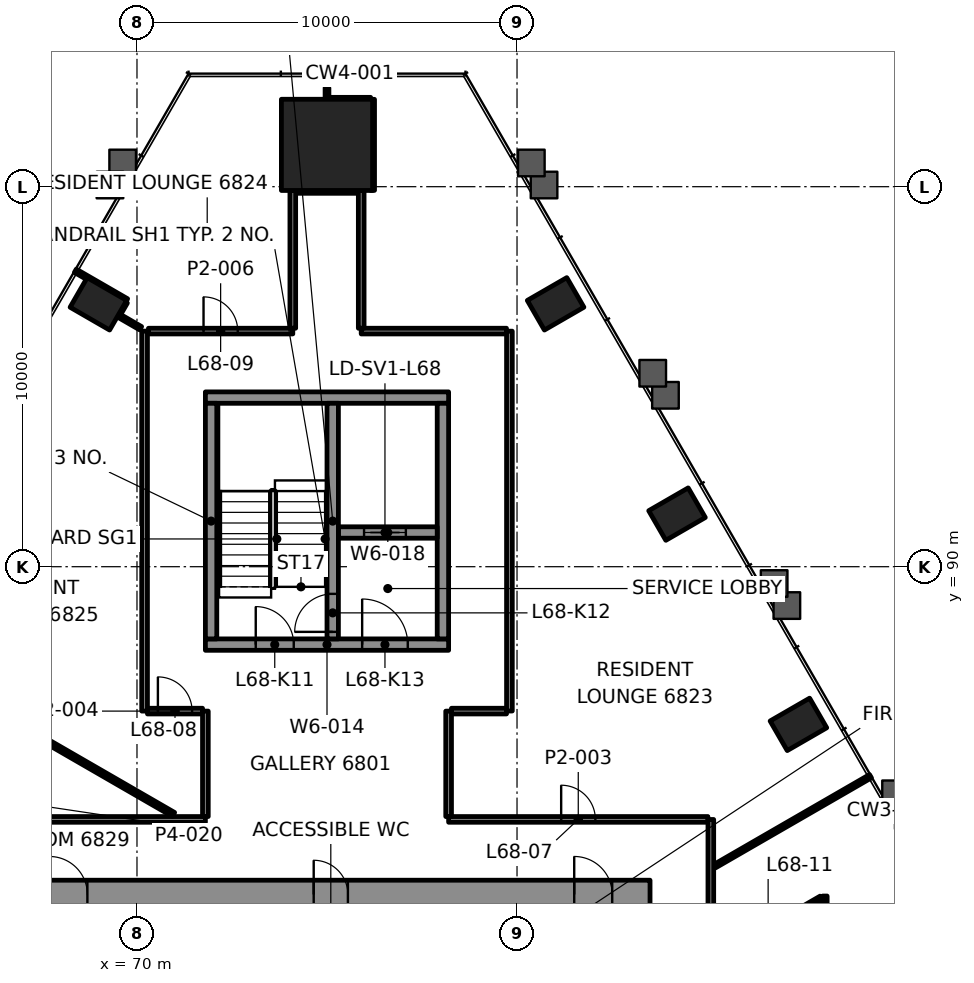
"""IFC4 building model, lengths in metres.
Left out: names, types, materials, properties, quantities, classifications, styles, units other than length and angle.
Written with IfcOpenShell. Run it as: python <this file> out.ifc"""

import sys

from ifc_helpers import new_model, si_unit, direction, frame, frame_2d, origin, origin_2d, place, context, subcontext, project, spatial, rectangle, hollow_rectangle, extrude, element, fill, save


model = new_model("IFC4")
c1 = context("Model", 3, precision=1e-05, world=origin(), true_north=direction((0.0, 1.0)))
c2 = subcontext(c1, "Body", "Model", "MODEL_VIEW")
j1 = project(units=[si_unit("LENGTHUNIT", "METRE"), si_unit("PLANEANGLEUNIT", "RADIAN")], contexts=[c1])
p1 = place(None, origin())
s1 = spatial("IfcSite", under=j1, at=p1, CompositionType="ELEMENT")
p2 = place(p1, origin())
s2 = spatial("IfcBuilding", under=s1, at=p2, CompositionType="ELEMENT")
p3 = place(p2, frame((0.0, 0.0, 284.6)))
s3 = spatial("IfcBuildingStorey", under=s2, at=p3, CompositionType="ELEMENT", Elevation=284.6)
p4 = place(p3, frame((75.0, 101.101, 0.0), z_axis=(0.0, 0.0, 1.0), x_axis=(-1.0, 0.0, 0.0)))
e1 = element("IfcColumn", 1, at=p4, inside=s3, PredefinedType="COLUMN", context=c2, shape_type="SweptSolid", body=[
    extrude(rectangle(XDim=2.4, YDim=2.4, at=origin_2d()), origin(), (0.0, 0.0, 1.0), 3.5),
])
for number, where, z_axis, x_axis in (
    (2, (87.405, 85.851, -0.0), (0.0, 0.0, 1.0), (-0.5, 0.866, 0.0)),
    (3, (84.21, 91.384, -0.0), (0.0, 0.0, 1.0), (-0.5, 0.866, 0.0)),
    (4, (81.015, 96.917, -0.0), (0.0, 0.0, 1.0), (-0.5, 0.866, 0.0)),
    (5, (68.985, 96.917, -0.0), (0.0, 0.0, 1.0), (-0.5, -0.866, 0.0)),
):
    element("IfcColumn", number, at=place(p3, frame(where, z_axis=z_axis, x_axis=x_axis)), inside=s3, PredefinedType="COLUMN", context=c2, shape_type="SweptSolid", body=[
        extrude(hollow_rectangle(XDim=0.9, YDim=1.2, WallThickness=0.06, at=origin_2d()), origin(), (0.0, 0.0, 1.0), 3.5),
    ])
p5 = place(p3, frame((66.5, 81.375, 0.0), z_axis=(0.0, 0.0, 1.0), x_axis=(1.0, 0.0, 0.0)))
e6 = element("IfcWall", 6, at=p5, inside=s3, PredefinedType="SHEAR", context=c2, shape_type="SweptSolid", body=[
    extrude(rectangle(XDim=17.0, YDim=0.75, at=frame_2d((8.5, 0.0))), origin(), (0.0, 0.0, 1.0), 3.3),
])
p6 = place(p5, frame((1.195, 0.0, 0.0)))
e7 = element("IfcOpeningElement", 7, at=p6, cuts=e6, PredefinedType="OPENING", context=c2, shape_type="SweptSolid", body=[
    extrude(rectangle(XDim=1.0, YDim=2.1, at=frame_2d((0.5, 1.05))), frame((0.0, 0.385, 0.0), z_axis=(0.0, -1.0, 0.0), x_axis=(1.0, 0.0, 0.0)), (0.0, 0.0, 1.0), 0.77),
])
p7 = place(p5, frame((15.005, 0.0, 0.0)))
e8 = element("IfcOpeningElement", 8, at=p7, cuts=e6, PredefinedType="OPENING", context=c2, shape_type="SweptSolid", body=[
    extrude(rectangle(XDim=1.0, YDim=2.1, at=frame_2d((0.5, 1.05))), frame((0.0, 0.385, 0.0), z_axis=(0.0, -1.0, 0.0), x_axis=(1.0, 0.0, 0.0)), (0.0, 0.0, 1.0), 0.77),
])
p8 = place(p5, frame((8.15, 0.0, 0.0)))
e9 = element("IfcOpeningElement", 9, at=p8, cuts=e6, PredefinedType="OPENING", context=c2, shape_type="SweptSolid", body=[
    extrude(rectangle(XDim=0.9, YDim=2.1, at=frame_2d((0.45, 1.05))), frame((0.0, 0.385, 0.0), z_axis=(0.0, -1.0, 0.0), x_axis=(1.0, 0.0, 0.0)), (0.0, 0.0, 1.0), 0.77),
])
p9 = place(p3, frame((71.8, 87.95, 0.0), z_axis=(0.0, 0.0, 1.0), x_axis=(1.0, 0.0, 0.0)))
e10 = element("IfcWall", 10, at=p9, inside=s3, PredefinedType="SHEAR", context=c2, shape_type="SweptSolid", body=[
    extrude(rectangle(XDim=6.4, YDim=0.3, at=frame_2d((3.2, 0.0))), origin(), (0.0, 0.0, 1.0), 3.3),
])
p10 = place(p9, frame((1.325, 0.0, 0.0)))
e11 = element("IfcOpeningElement", 11, at=p10, cuts=e10, PredefinedType="OPENING", context=c2, shape_type="SweptSolid", body=[
    extrude(rectangle(XDim=1.0, YDim=2.1, at=frame_2d((0.5, 1.05))), frame((0.0, 0.16, 0.0), z_axis=(0.0, -1.0, 0.0), x_axis=(1.0, 0.0, 0.0)), (0.0, 0.0, 1.0), 0.32),
])
p11 = place(p9, frame((4.125, 0.0, 0.0)))
e12 = element("IfcOpeningElement", 12, at=p11, cuts=e10, PredefinedType="OPENING", context=c2, shape_type="SweptSolid", body=[
    extrude(rectangle(XDim=1.2, YDim=2.1, at=frame_2d((0.6, 1.05))), frame((0.0, 0.16, 0.0), z_axis=(0.0, -1.0, 0.0), x_axis=(1.0, 0.0, 0.0)), (0.0, 0.0, 1.0), 0.32),
])
p12 = place(p3, frame((71.8, 94.45, 0.0), z_axis=(0.0, 0.0, 1.0), x_axis=(1.0, 0.0, 0.0)))
e13 = element("IfcWall", 13, at=p12, inside=s3, PredefinedType="SHEAR", context=c2, shape_type="SweptSolid", body=[
    extrude(rectangle(XDim=6.4, YDim=0.3, at=frame_2d((3.2, 0.0))), origin(), (0.0, 0.0, 1.0), 3.3),
])
for number, where, z_axis, x_axis in (
    (14, (71.95, 88.1, 0.0), (0.0, 0.0, 1.0), (0.0, 1.0, 0.0)),
    (15, (78.05, 88.1, 0.0), (0.0, 0.0, 1.0), (0.0, 1.0, 0.0)),
):
    element("IfcWall", number, at=place(p3, frame(where, z_axis=z_axis, x_axis=x_axis)), inside=s3, PredefinedType="SHEAR", context=c2, shape_type="SweptSolid", body=[
        extrude(rectangle(XDim=6.2, YDim=0.3, at=frame_2d((3.1, 0.0))), origin(), (0.0, 0.0, 1.0), 3.3),
    ])
p13 = place(p3, frame((75.3, 90.9, 0.0), z_axis=(0.0, 0.0, 1.0), x_axis=(1.0, 0.0, 0.0)))
e16 = element("IfcWall", 16, at=p13, inside=s3, PredefinedType="SHEAR", context=c2, shape_type="SweptSolid", body=[
    extrude(rectangle(XDim=2.6, YDim=0.3, at=frame_2d((1.3, 0.0))), origin(), (0.0, 0.0, 1.0), 3.3),
])
p14 = place(p13, frame((0.675, 0.0, 0.0)))
e17 = element("IfcOpeningElement", 17, at=p14, cuts=e16, PredefinedType="OPENING", context=c2, shape_type="SweptSolid", body=[
    extrude(rectangle(XDim=1.1, YDim=2.1, at=frame_2d((0.55, 1.05))), frame((0.0, 0.16, 0.0), z_axis=(0.0, -1.0, 0.0), x_axis=(1.0, 0.0, 0.0)), (0.0, 0.0, 1.0), 0.32),
])
p15 = place(p3, frame((75.15, 88.1, 0.0), z_axis=(0.0, 0.0, 1.0), x_axis=(0.0, 1.0, 0.0)))
e18 = element("IfcWall", 18, at=p15, inside=s3, PredefinedType="SHEAR", context=c2, shape_type="SweptSolid", body=[
    extrude(rectangle(XDim=6.2, YDim=0.3, at=frame_2d((3.1, 0.0))), origin(), (0.0, 0.0, 1.0), 3.3),
])
p16 = place(p15, frame((0.185, 0.0, 0.0)))
e19 = element("IfcOpeningElement", 19, at=p16, cuts=e18, PredefinedType="OPENING", context=c2, shape_type="SweptSolid", body=[
    extrude(rectangle(XDim=1.0, YDim=2.1, at=frame_2d((0.5, 1.05))), frame((0.0, 0.16, 0.0), z_axis=(0.0, -1.0, 0.0), x_axis=(1.0, 0.0, 0.0)), (0.0, 0.0, 1.0), 0.32),
])
p17 = place(p3, frame((64.975, 83.35, 0.0), z_axis=(0.0, 0.0, 1.0), x_axis=(1.0, 0.0, 0.0)))
e20 = element("IfcWall", 20, at=p17, inside=s3, PredefinedType="PARTITIONING", context=c2, shape_type="SweptSolid", body=[
    extrude(rectangle(XDim=6.825, YDim=0.15, at=frame_2d((3.413, 0.0))), origin(), (0.0, 0.0, 1.0), 2.7),
])
p18 = place(p3, frame((78.2, 83.35, 0.0), z_axis=(0.0, 0.0, 1.0), x_axis=(1.0, 0.0, 0.0)))
e21 = element("IfcWall", 21, at=p18, inside=s3, PredefinedType="PARTITIONING", context=c2, shape_type="SweptSolid", body=[
    extrude(rectangle(XDim=6.823, YDim=0.15, at=frame_2d((3.412, 0.0))), origin(), (0.0, 0.0, 1.0), 2.7),
])
p19 = place(p18, frame((2.961, 0.0, 0.0)))
e22 = element("IfcOpeningElement", 22, at=p19, cuts=e21, PredefinedType="OPENING", context=c2, shape_type="SweptSolid", body=[
    extrude(rectangle(XDim=0.9, YDim=2.1, at=frame_2d((0.45, 1.05))), frame((0.0, 0.085, 0.0), z_axis=(0.0, -1.0, 0.0), x_axis=(1.0, 0.0, 0.0)), (0.0, 0.0, 1.0), 0.17),
])
p20 = place(p3, frame((70.276, 86.2, 0.0), z_axis=(0.0, 0.0, 1.0), x_axis=(1.0, 0.0, 0.0)))
e23 = element("IfcWall", 23, at=p20, inside=s3, PredefinedType="PARTITIONING", context=c2, shape_type="SweptSolid", body=[
    extrude(rectangle(XDim=1.449, YDim=0.15, at=frame_2d((0.725, 0.0))), origin(), (0.0, 0.0, 1.0), 2.7),
])
p21 = place(p20, frame((0.275, 0.0, 0.0)))
e24 = element("IfcOpeningElement", 24, at=p21, cuts=e23, PredefinedType="OPENING", context=c2, shape_type="SweptSolid", body=[
    extrude(rectangle(XDim=0.9, YDim=2.1, at=frame_2d((0.45, 1.05))), frame((0.0, 0.085, 0.0), z_axis=(0.0, -1.0, 0.0), x_axis=(1.0, 0.0, 0.0)), (0.0, 0.0, 1.0), 0.17),
])
p22 = place(p3, frame((78.275, 86.2, 0.0), z_axis=(0.0, 0.0, 1.0), x_axis=(1.0, 0.0, 0.0)))
e25 = element("IfcWall", 25, at=p22, inside=s3, PredefinedType="PARTITIONING", context=c2, shape_type="SweptSolid", body=[
    extrude(rectangle(XDim=1.448, YDim=0.15, at=frame_2d((0.724, 0.0))), origin(), (0.0, 0.0, 1.0), 2.7),
])
p23 = place(p3, frame((70.302, 96.2, 0.0), z_axis=(0.0, 0.0, 1.0), x_axis=(1.0, 0.0, 0.0)))
e26 = element("IfcWall", 26, at=p23, inside=s3, PredefinedType="PARTITIONING", context=c2, shape_type="SweptSolid", body=[
    extrude(rectangle(XDim=3.798, YDim=0.15, at=frame_2d((1.899, 0.0))), origin(), (0.0, 0.0, 1.0), 2.7),
])
p24 = place(p23, frame((1.449, 0.0, 0.0)))
e27 = element("IfcOpeningElement", 27, at=p24, cuts=e26, PredefinedType="OPENING", context=c2, shape_type="SweptSolid", body=[
    extrude(rectangle(XDim=0.9, YDim=2.1, at=frame_2d((0.45, 1.05))), frame((0.0, 0.085, 0.0), z_axis=(0.0, -1.0, 0.0), x_axis=(1.0, 0.0, 0.0)), (0.0, 0.0, 1.0), 0.17),
])
p25 = place(p3, frame((75.9, 96.2, 0.0), z_axis=(0.0, 0.0, 1.0), x_axis=(1.0, 0.0, 0.0)))
e28 = element("IfcWall", 28, at=p25, inside=s3, PredefinedType="PARTITIONING", context=c2, shape_type="SweptSolid", body=[
    extrude(rectangle(XDim=3.823, YDim=0.15, at=frame_2d((1.911, 0.0))), origin(), (0.0, 0.0, 1.0), 2.7),
])
p26 = place(p3, frame((74.176, 99.901, 0.0), z_axis=(0.0, 0.0, 1.0), x_axis=(1.0, 0.0, 0.0)))
e29 = element("IfcWall", 29, at=p26, inside=s3, PredefinedType="PARTITIONING", context=c2, shape_type="SweptSolid", body=[
    extrude(rectangle(XDim=1.642, YDim=0.15, at=frame_2d((0.821, 0.0))), origin(), (0.0, 0.0, 1.0), 2.697),
])
p27 = place(p3, frame((75.0, 102.301, 0.0), z_axis=(0.0, 0.0, 1.0), x_axis=(1.0, 0.0, 0.0)))
e30 = element("IfcWall", 30, at=p27, inside=s3, PredefinedType="PARTITIONING", context=c2, shape_type="SweptSolid", body=[
    extrude(rectangle(XDim=1.147, YDim=0.1, at=frame_2d((0.574, 0.0))), origin(), (0.0, 0.0, 1.0), 2.7),
])
p28 = place(p3, frame((88.005, 81.279, 0.0), z_axis=(0.0, 0.0, 1.0), x_axis=(-0.866000447062, -0.500043223821, 0.0)))
e31 = element("IfcWall", 31, at=p28, inside=s3, PredefinedType="PARTITIONING", context=c2, shape_type="SweptSolid", body=[
    extrude(rectangle(XDim=3.228, YDim=0.12, at=frame_2d((1.614, 0.0))), origin(), (0.0, 0.0, 1.0), 2.7),
])
p29 = place(p28, frame((1.214, 0.0, 0.0)))
e32 = element("IfcOpeningElement", 32, at=p29, cuts=e31, PredefinedType="OPENING", context=c2, shape_type="SweptSolid", body=[
    extrude(rectangle(XDim=0.8, YDim=2.1, at=frame_2d((0.4, 1.05))), frame((0.0, 0.07, 0.0), z_axis=(0.0, -1.0, 0.0), x_axis=(1.0, 0.0, 0.0)), (0.0, 0.0, 1.0), 0.14),
])
p30 = place(p3, frame((85.201, 82.119, 0.0), z_axis=(0.0, 0.0, 1.0), x_axis=(0.866035297817, 0.499982862641, 0.0)))
e33 = element("IfcWall", 33, at=p30, inside=s3, PredefinedType="PARTITIONING", context=c2, shape_type="SweptSolid", body=[
    extrude(rectangle(XDim=4.734, YDim=0.1, at=frame_2d((2.367, 0.0))), origin(), (0.0, 0.0, 1.0), 2.688),
])
p31 = place(p3, frame((69.53, 96.661, 0.0), z_axis=(0.0, 0.0, 1.0), x_axis=(0.499904278411, 0.866080661617, 0.0)))
e34 = element("IfcWall", 34, at=p31, inside=s3, PredefinedType="PARTITIONING", context=c2, shape_type="SweptSolid", body=[
    extrude(rectangle(XDim=0.349, YDim=0.1, at=frame_2d((0.174, 0.0))), origin(), (0.0, 0.0, 1.0), 2.7),
])
p32 = place(p3, frame((88.1, 81.334, 0.0), z_axis=(0.0, 0.0, 1.0), x_axis=(0.0, -1.0, 0.0)))
e35 = element("IfcWall", 35, at=p32, inside=s3, PredefinedType="PARTITIONING", context=c2, shape_type="SweptSolid", body=[
    extrude(rectangle(XDim=7.378, YDim=0.12, at=frame_2d((3.689, 0.0))), origin(), (0.0, 0.0, 1.0), 2.7),
])
p33 = place(p32, frame((4.982, 0.0, 0.0)))
e36 = element("IfcOpeningElement", 36, at=p33, cuts=e35, PredefinedType="OPENING", context=c2, shape_type="SweptSolid", body=[
    extrude(rectangle(XDim=0.9, YDim=2.1, at=frame_2d((0.45, 1.05))), frame((0.0, 0.07, 0.0), z_axis=(0.0, -1.0, 0.0), x_axis=(1.0, 0.0, 0.0)), (0.0, 0.0, 1.0), 0.14),
])
p34 = place(p3, frame((85.1, 83.348, 0.0), z_axis=(0.0, 0.0, 1.0), x_axis=(0.0, -1.0, 0.0)))
e37 = element("IfcWall", 37, at=p34, inside=s3, PredefinedType="PARTITIONING", context=c2, shape_type="SweptSolid", body=[
    extrude(rectangle(XDim=13.053, YDim=0.15, at=frame_2d((6.527, 0.0))), origin(), (0.0, 0.0, 1.0), 2.7),
])
p35 = place(p34, frame((8.78, 0.0, 0.0)))
e38 = element("IfcOpeningElement", 38, at=p35, cuts=e37, PredefinedType="OPENING", context=c2, shape_type="SweptSolid", body=[
    extrude(rectangle(XDim=1.0, YDim=2.1, at=frame_2d((0.5, 1.05))), frame((0.0, 0.085, 0.0), z_axis=(0.0, -1.0, 0.0), x_axis=(1.0, 0.0, 0.0)), (0.0, 0.0, 1.0), 0.17),
])
p36 = place(p34, frame((11.537, 0.0, 0.0)))
e39 = element("IfcOpeningElement", 39, at=p36, cuts=e37, PredefinedType="OPENING", context=c2, shape_type="SweptSolid", body=[
    extrude(rectangle(XDim=0.9, YDim=2.1, at=frame_2d((0.45, 1.05))), frame((0.0, 0.085, 0.0), z_axis=(0.0, -1.0, 0.0), x_axis=(1.0, 0.0, 0.0)), (0.0, 0.0, 1.0), 0.17),
])
p37 = place(p3, frame((79.8, 86.202, 0.0), z_axis=(0.0, 0.0, 1.0), x_axis=(0.0, 1.0, 0.0)))
e40 = element("IfcWall", 40, at=p37, inside=s3, PredefinedType="PARTITIONING", context=c2, shape_type="SweptSolid", body=[
    extrude(rectangle(XDim=9.996, YDim=0.15, at=frame_2d((4.998, 0.0))), origin(), (0.0, 0.0, 1.0), 2.7),
])
p38 = place(p3, frame((78.2, 83.425, 0.0), z_axis=(0.0, 0.0, 1.0), x_axis=(0.0, 1.0, 0.0)))
e41 = element("IfcWall", 41, at=p38, inside=s3, PredefinedType="PARTITIONING", context=c2, shape_type="SweptSolid", body=[
    extrude(rectangle(XDim=2.775, YDim=0.15, at=frame_2d((1.387, 0.0))), origin(), (0.0, 0.0, 1.0), 2.697),
])
p39 = place(p3, frame((76.2, 99.903, 0.0), z_axis=(0.0, 0.0, 1.0), x_axis=(0.0, 1.0, 0.0)))
e42 = element("IfcWall", 42, at=p39, inside=s3, PredefinedType="PARTITIONING", context=c2, shape_type="SweptSolid", body=[
    extrude(rectangle(XDim=2.396, YDim=0.1, at=frame_2d((1.198, 0.0))), origin(), (0.0, 0.0, 1.0), 2.7),
])
p40 = place(p3, frame((75.9, 96.275, 0.0), z_axis=(0.0, 0.0, 1.0), x_axis=(0.0, 1.0, 0.0)))
e43 = element("IfcWall", 43, at=p40, inside=s3, PredefinedType="PARTITIONING", context=c2, shape_type="SweptSolid", body=[
    extrude(rectangle(XDim=3.625, YDim=0.15, at=frame_2d((1.813, 0.0))), origin(), (0.0, 0.0, 1.0), 2.7),
])
p41 = place(p3, frame((75.0, 102.351, 0.0), z_axis=(0.0, 0.0, 1.0), x_axis=(0.0, 1.0, 0.0)))
e44 = element("IfcWall", 44, at=p41, inside=s3, PredefinedType="PARTITIONING", context=c2, shape_type="SweptSolid", body=[
    extrude(rectangle(XDim=0.25, YDim=0.1, at=frame_2d((0.125, 0.0))), origin(), (0.0, 0.0, 1.0), 2.7),
])
p42 = place(p3, frame((74.1, 96.275, 0.0), z_axis=(0.0, 0.0, 1.0), x_axis=(0.0, 1.0, 0.0)))
e45 = element("IfcWall", 45, at=p42, inside=s3, PredefinedType="PARTITIONING", context=c2, shape_type="SweptSolid", body=[
    extrude(rectangle(XDim=3.625, YDim=0.15, at=frame_2d((1.812, 0.0))), origin(), (0.0, 0.0, 1.0), 2.7),
])
p43 = place(p3, frame((71.8, 83.425, 0.0), z_axis=(0.0, 0.0, 1.0), x_axis=(0.0, 1.0, 0.0)))
e46 = element("IfcWall", 46, at=p43, inside=s3, PredefinedType="PARTITIONING", context=c2, shape_type="SweptSolid", body=[
    extrude(rectangle(XDim=2.775, YDim=0.15, at=frame_2d((1.387, 0.0))), origin(), (0.0, 0.0, 1.0), 2.697),
])
p44 = place(p3, frame((70.2, 86.2, 0.0), z_axis=(0.0, 0.0, 1.0), x_axis=(0.0, 1.0, 0.0)))
e47 = element("IfcWall", 47, at=p44, inside=s3, PredefinedType="PARTITIONING", context=c2, shape_type="SweptSolid", body=[
    extrude(rectangle(XDim=9.999, YDim=0.15, at=frame_2d((5.0, 0.0))), origin(), (0.0, 0.0, 1.0), 2.7),
])
p45 = place(p3, frame((69.729, 97.007, 0.0), z_axis=(0.0, 0.0, 1.0), x_axis=(-0.866018739521, 0.500011542666, 0.0)))
e48 = element("IfcWall", 48, at=p45, inside=s3, PredefinedType="PARTITIONING", context=c2, shape_type="SweptSolid", body=[
    extrude(rectangle(XDim=1.56, YDim=0.1, at=frame_2d((0.78, 0.0))), origin(), (0.0, 0.0, 1.0), 2.7),
])
p46 = place(p3, frame((70.097, 96.275, 0.0), z_axis=(0.0, 0.0, 1.0), x_axis=(-0.866060802215, 0.499938683108, 0.0)))
e49 = element("IfcWall", 49, at=p46, inside=s3, PredefinedType="PARTITIONING", context=c2, shape_type="SweptSolid", body=[
    extrude(rectangle(XDim=0.684, YDim=0.1, at=frame_2d((0.342, 0.0))), origin(), (0.0, 0.0, 1.0), 2.7),
])
p47 = place(p3, frame((70.961, 83.48, 0.0), z_axis=(0.0, 0.0, 1.0), x_axis=(-0.86603330177, 0.499986320039, 0.0)))
e50 = element("IfcWall", 50, at=p47, inside=s3, PredefinedType="PARTITIONING", context=c2, shape_type="SweptSolid", body=[
    extrude(rectangle(XDim=5.74, YDim=0.12, at=frame_2d((2.87, 0.0))), origin(), (0.0, 0.0, 1.0), 2.7),
])
p48 = place(p19, origin())
e51 = element("IfcDoor", 51, at=p48, inside=s3, OperationType="SINGLE_SWING_RIGHT", PredefinedType="DOOR", context=c2, shape_type="SweptSolid", body=[
    extrude(rectangle(XDim=0.9, YDim=2.1, at=frame_2d((0.45, 1.05))), frame((0.0, 0.025, 0.0), z_axis=(0.0, -1.0, 0.0), x_axis=(1.0, 0.0, 0.0)), (0.0, 0.0, 1.0), 0.05),
])
fill(e22, e51)
p49 = place(p21, origin())
e52 = element("IfcDoor", 52, at=p49, inside=s3, OperationType="SINGLE_SWING_RIGHT", PredefinedType="DOOR", context=c2, shape_type="SweptSolid", body=[
    extrude(rectangle(XDim=0.9, YDim=2.1, at=frame_2d((0.45, 1.05))), frame((0.0, 0.025, 0.0), z_axis=(0.0, -1.0, 0.0), x_axis=(1.0, 0.0, 0.0)), (0.0, 0.0, 1.0), 0.05),
])
fill(e24, e52)
p50 = place(p24, origin())
e53 = element("IfcDoor", 53, at=p50, inside=s3, OperationType="SINGLE_SWING_LEFT", PredefinedType="DOOR", context=c2, shape_type="SweptSolid", body=[
    extrude(rectangle(XDim=0.9, YDim=2.1, at=frame_2d((0.45, 1.05))), frame((0.0, 0.025, 0.0), z_axis=(0.0, -1.0, 0.0), x_axis=(1.0, 0.0, 0.0)), (0.0, 0.0, 1.0), 0.05),
])
fill(e27, e53)
p51 = place(p14, origin())
e54 = element("IfcDoor", 54, at=p51, inside=s3, OperationType="DOUBLE_DOOR_SLIDING", PredefinedType="DOOR", context=c2, shape_type="SweptSolid", body=[
    extrude(rectangle(XDim=1.1, YDim=2.1, at=frame_2d((0.55, 1.05))), frame((0.0, 0.025, 0.0), z_axis=(0.0, -1.0, 0.0), x_axis=(1.0, 0.0, 0.0)), (0.0, 0.0, 1.0), 0.05),
])
fill(e17, e54)
p52 = place(p6, origin())
e55 = element("IfcDoor", 55, at=p52, inside=s3, OperationType="SINGLE_SWING_RIGHT", PredefinedType="DOOR", context=c2, shape_type="SweptSolid", body=[
    extrude(rectangle(XDim=1.0, YDim=2.1, at=frame_2d((0.5, 1.05))), frame((0.0, 0.095, 0.0), z_axis=(0.0, -1.0, 0.0), x_axis=(1.0, 0.0, 0.0)), (0.0, 0.0, 1.0), 0.19),
])
fill(e7, e55)
p53 = place(p7, origin())
e56 = element("IfcDoor", 56, at=p53, inside=s3, OperationType="SINGLE_SWING_LEFT", PredefinedType="DOOR", context=c2, shape_type="SweptSolid", body=[
    extrude(rectangle(XDim=1.0, YDim=2.1, at=frame_2d((0.5, 1.05))), frame((0.0, 0.095, 0.0), z_axis=(0.0, -1.0, 0.0), x_axis=(1.0, 0.0, 0.0)), (0.0, 0.0, 1.0), 0.19),
])
fill(e8, e56)
p54 = place(p10, origin())
e57 = element("IfcDoor", 57, at=p54, inside=s3, OperationType="SINGLE_SWING_RIGHT", PredefinedType="DOOR", context=c2, shape_type="SweptSolid", body=[
    extrude(rectangle(XDim=1.0, YDim=2.1, at=frame_2d((0.5, 1.05))), frame((0.0, 0.025, 0.0), z_axis=(0.0, -1.0, 0.0), x_axis=(1.0, 0.0, 0.0)), (0.0, 0.0, 1.0), 0.05),
])
fill(e11, e57)
p55 = place(p16, origin())
e58 = element("IfcDoor", 58, at=p55, inside=s3, OperationType="SINGLE_SWING_LEFT", PredefinedType="DOOR", context=c2, shape_type="SweptSolid", body=[
    extrude(rectangle(XDim=1.0, YDim=2.1, at=frame_2d((0.5, 1.05))), frame((0.0, 0.025, 0.0), z_axis=(0.0, -1.0, 0.0), x_axis=(1.0, 0.0, 0.0)), (0.0, 0.0, 1.0), 0.05),
])
fill(e19, e58)
p56 = place(p11, origin())
e59 = element("IfcDoor", 59, at=p56, inside=s3, OperationType="SINGLE_SWING_RIGHT", PredefinedType="DOOR", context=c2, shape_type="SweptSolid", body=[
    extrude(rectangle(XDim=1.2, YDim=2.1, at=frame_2d((0.6, 1.05))), frame((0.0, 0.025, 0.0), z_axis=(0.0, -1.0, 0.0), x_axis=(1.0, 0.0, 0.0)), (0.0, 0.0, 1.0), 0.05),
])
fill(e12, e59)
p57 = place(p8, origin())
e60 = element("IfcDoor", 60, at=p57, inside=s3, OperationType="SINGLE_SWING_RIGHT", PredefinedType="DOOR", context=c2, shape_type="SweptSolid", body=[
    extrude(rectangle(XDim=0.9, YDim=2.1, at=frame_2d((0.45, 1.05))), frame((0.0, 0.095, 0.0), z_axis=(0.0, -1.0, 0.0), x_axis=(1.0, 0.0, 0.0)), (0.0, 0.0, 1.0), 0.19),
])
fill(e9, e60)
save(model, sys.argv[1])
